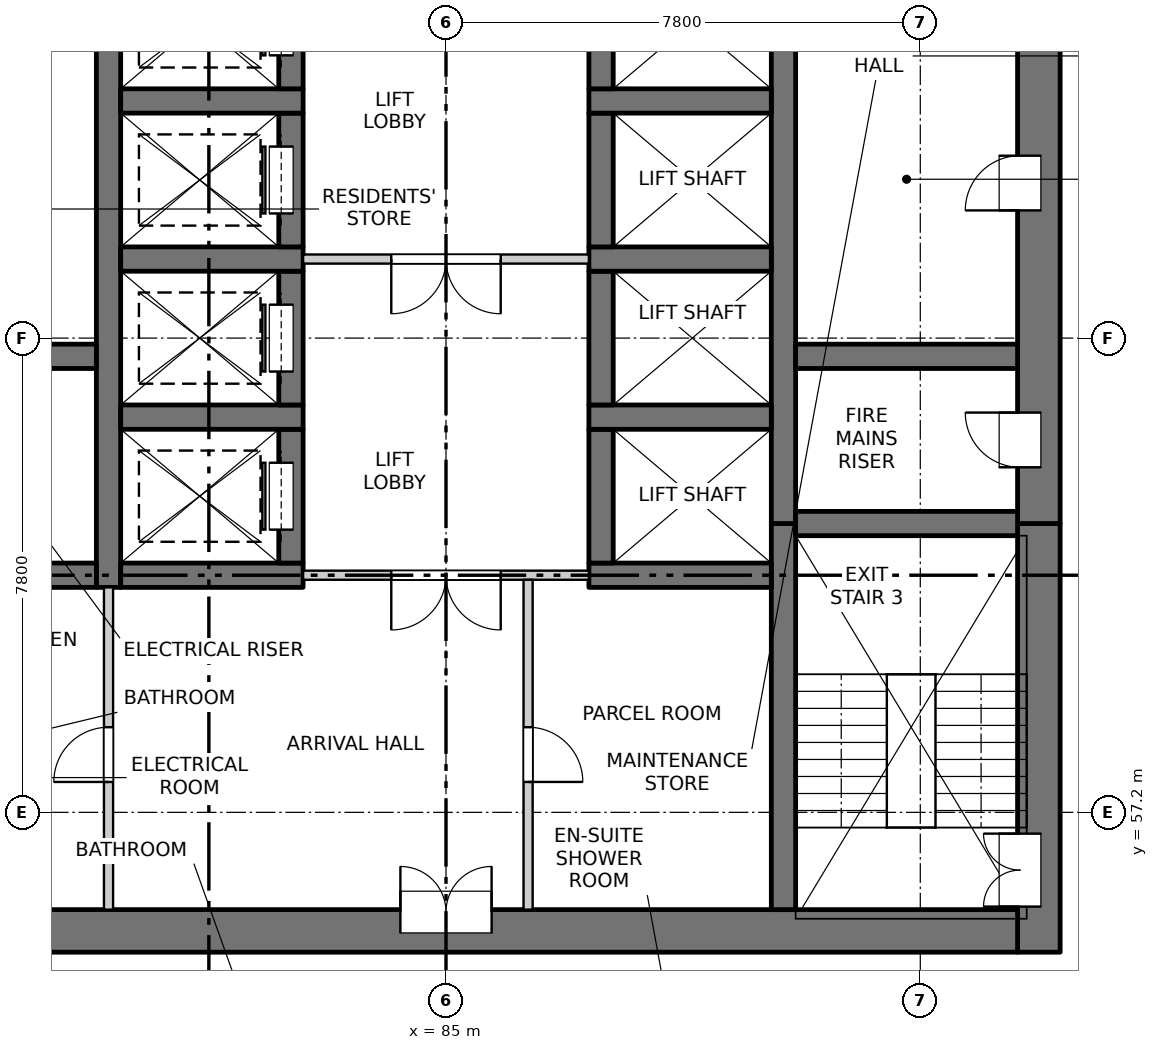
"""IFC4 building model, lengths in metres.
Left out: names, types, materials, properties, quantities, classifications, styles, units other than length and angle.
Written with IfcOpenShell. Run it as: python <this file> out.ifc"""

import sys

from ifc_helpers import new_model, si_unit, direction, frame, frame_2d, origin, place, context, subcontext, project, spatial, rectangle, extrude, element, fill, save


model = new_model("IFC4")
c1 = context("Model", 3, precision=1e-05, world=origin(), true_north=direction((0.0, 1.0)))
c2 = subcontext(c1, "Body", "Model", "MODEL_VIEW")
j1 = project(units=[si_unit("LENGTHUNIT", "METRE"), si_unit("PLANEANGLEUNIT", "RADIAN")], contexts=[c1])
p1 = place(None, origin())
s1 = spatial("IfcSite", under=j1, at=p1, CompositionType="ELEMENT")
p2 = place(p1, origin())
s2 = spatial("IfcBuilding", under=s1, at=p2, CompositionType="ELEMENT")
p3 = place(p2, frame((0.0, 0.0, 43.3)))
s3 = spatial("IfcBuildingStorey", under=s2, at=p3, CompositionType="ELEMENT", Elevation=43.3)
p4 = place(p3, frame((94.75, 54.9, -0.25), z_axis=(0.0, 0.0, 1.0), x_axis=(0.0, 1.0, 0.0)))
e1 = element("IfcWall", 1, at=p4, inside=s3, PredefinedType="SOLIDWALL", context=c2, shape_type="SweptSolid", body=[
    extrude(rectangle(XDim=7.05, YDim=0.7, at=frame_2d((3.525, 0.0))), origin(), (0.0, 0.0, 1.0), 3.35),
])
p5 = place(p4, frame((0.75, 0.0, 0.25)))
e2 = element("IfcOpeningElement", 2, at=p5, cuts=e1, PredefinedType="OPENING", context=c2, shape_type="SweptSolid", body=[
    extrude(rectangle(XDim=1.2, YDim=2.1, at=frame_2d((0.6, 1.05))), frame((0.0, 0.36, 0.0), z_axis=(0.0, -1.0, 0.0), x_axis=(1.0, 0.0, 0.0)), (0.0, 0.0, 1.0), 0.72),
])
p6 = place(p3, frame((94.75, 61.95, -0.25), z_axis=(0.0, 0.0, 1.0), x_axis=(0.0, 1.0, 0.0)))
e3 = element("IfcWall", 3, at=p6, inside=s3, PredefinedType="SOLIDWALL", context=c2, shape_type="SweptSolid", body=[
    extrude(rectangle(XDim=15.35, YDim=0.7, at=frame_2d((7.675, 0.0))), origin(), (0.0, 0.0, 1.0), 3.35),
])
p7 = place(p6, frame((0.925, 0.0, 0.25)))
e4 = element("IfcOpeningElement", 4, at=p7, cuts=e3, PredefinedType="OPENING", context=c2, shape_type="SweptSolid", body=[
    extrude(rectangle(XDim=0.9, YDim=2.1, at=frame_2d((0.45, 1.05))), frame((0.0, 0.36, 0.0), z_axis=(0.0, -1.0, 0.0), x_axis=(1.0, 0.0, 0.0)), (0.0, 0.0, 1.0), 0.72),
])
p8 = place(p6, frame((5.15, 0.0, 0.25)))
e5 = element("IfcOpeningElement", 5, at=p8, cuts=e3, PredefinedType="OPENING", context=c2, shape_type="SweptSolid", body=[
    extrude(rectangle(XDim=0.9, YDim=2.1, at=frame_2d((0.45, 1.05))), frame((0.0, 0.36, 0.0), z_axis=(0.0, -1.0, 0.0), x_axis=(1.0, 0.0, 0.0)), (0.0, 0.0, 1.0), 0.72),
])
p9 = place(p6, frame((9.65, 0.0, 0.25)))
e6 = element("IfcOpeningElement", 6, at=p9, cuts=e3, PredefinedType="OPENING", context=c2, shape_type="SweptSolid", body=[
    extrude(rectangle(XDim=0.9, YDim=2.1, at=frame_2d((0.45, 1.05))), frame((0.0, 0.36, 0.0), z_axis=(0.0, -1.0, 0.0), x_axis=(1.0, 0.0, 0.0)), (0.0, 0.0, 1.0), 0.72),
])
p10 = place(p6, frame((13.1, 0.0, 0.25)))
e7 = element("IfcOpeningElement", 7, at=p10, cuts=e3, PredefinedType="OPENING", context=c2, shape_type="SweptSolid", body=[
    extrude(rectangle(XDim=0.9, YDim=2.1, at=frame_2d((0.45, 1.05))), frame((0.0, 0.36, 0.0), z_axis=(0.0, -1.0, 0.0), x_axis=(1.0, 0.0, 0.0)), (0.0, 0.0, 1.0), 0.72),
])
p11 = place(p3, frame((75.6, 55.25, -0.25), z_axis=(0.0, 0.0, 1.0), x_axis=(1.0, 0.0, 0.0)))
e8 = element("IfcWall", 8, at=p11, inside=s3, PredefinedType="SOLIDWALL", context=c2, shape_type="SweptSolid", body=[
    extrude(rectangle(XDim=18.8, YDim=0.7, at=frame_2d((9.4, 0.0))), origin(), (0.0, 0.0, 1.0), 3.35),
])
p12 = place(p11, frame((8.65, 0.0, 0.25)))
e9 = element("IfcOpeningElement", 9, at=p12, cuts=e8, PredefinedType="OPENING", context=c2, shape_type="SweptSolid", body=[
    extrude(rectangle(XDim=1.5, YDim=2.1, at=frame_2d((0.75, 1.05))), frame((0.0, 0.36, 0.0), z_axis=(0.0, -1.0, 0.0), x_axis=(1.0, 0.0, 0.0)), (0.0, 0.0, 1.0), 0.72),
])
p13 = place(p3, frame((79.45, 60.9, -0.25), z_axis=(0.0, 0.0, 1.0), x_axis=(0.0, 1.0, 0.0)))
e10 = element("IfcWall", 10, at=p13, inside=s3, PredefinedType="SOLIDWALL", context=c2, shape_type="SweptSolid", body=[
    extrude(rectangle(XDim=16.4, YDim=0.4, at=frame_2d((8.2, 0.0))), origin(), (0.0, 0.0, 1.0), 3.35),
])
p14 = place(p3, frame((90.55, 55.6, -0.25), z_axis=(0.0, 0.0, 1.0), x_axis=(0.0, 1.0, 0.0)))
e11 = element("IfcWall", 11, at=p14, inside=s3, PredefinedType="SOLIDWALL", context=c2, shape_type="SweptSolid", body=[
    extrude(rectangle(XDim=6.35, YDim=0.4, at=frame_2d((3.175, 0.0))), origin(), (0.0, 0.0, 1.0), 3.35),
])
p15 = place(p3, frame((90.55, 61.95, -0.25), z_axis=(0.0, 0.0, 1.0), x_axis=(0.0, 1.0, 0.0)))
e12 = element("IfcWall", 12, at=p15, inside=s3, PredefinedType="SOLIDWALL", context=c2, shape_type="SweptSolid", body=[
    extrude(rectangle(XDim=15.35, YDim=0.4, at=frame_2d((7.675, 0.0))), origin(), (0.0, 0.0, 1.0), 3.35),
])
p16 = place(p3, frame((79.65, 61.1, -0.25), z_axis=(0.0, 0.0, 1.0), x_axis=(1.0, 0.0, 0.0)))
e13 = element("IfcWall", 13, at=p16, inside=s3, PredefinedType="SOLIDWALL", context=c2, shape_type="SweptSolid", body=[
    extrude(rectangle(XDim=3.0, YDim=0.4, at=frame_2d((1.5, 0.0))), origin(), (0.0, 0.0, 1.0), 3.35),
])
p17 = place(p3, frame((82.45, 61.3, -0.25), z_axis=(0.0, 0.0, 1.0), x_axis=(0.0, 1.0, 0.0)))
e14 = element("IfcWall", 14, at=p17, inside=s3, PredefinedType="SOLIDWALL", context=c2, shape_type="SweptSolid", body=[
    extrude(rectangle(XDim=2.2, YDim=0.4, at=frame_2d((1.1, 0.0))), origin(), (0.0, 0.0, 1.0), 3.35),
])
p18 = place(p17, frame((0.55, 0.0, 0.25)))
e15 = element("IfcOpeningElement", 15, at=p18, cuts=e14, PredefinedType="OPENING", context=c2, shape_type="SweptSolid", body=[
    extrude(rectangle(XDim=1.1, YDim=2.1, at=frame_2d((0.55, 1.05))), frame((0.0, 0.21, 0.0), z_axis=(0.0, -1.0, 0.0), x_axis=(1.0, 0.0, 0.0)), (0.0, 0.0, 1.0), 0.42),
])
p19 = place(p3, frame((79.65, 63.7, -0.25), z_axis=(0.0, 0.0, 1.0), x_axis=(1.0, 0.0, 0.0)))
e16 = element("IfcWall", 16, at=p19, inside=s3, PredefinedType="SOLIDWALL", context=c2, shape_type="SweptSolid", body=[
    extrude(rectangle(XDim=3.0, YDim=0.4, at=frame_2d((1.5, 0.0))), origin(), (0.0, 0.0, 1.0), 3.35),
])
p20 = place(p3, frame((82.45, 63.9, -0.25), z_axis=(0.0, 0.0, 1.0), x_axis=(0.0, 1.0, 0.0)))
e17 = element("IfcWall", 17, at=p20, inside=s3, PredefinedType="SOLIDWALL", context=c2, shape_type="SweptSolid", body=[
    extrude(rectangle(XDim=2.2, YDim=0.4, at=frame_2d((1.1, 0.0))), origin(), (0.0, 0.0, 1.0), 3.35),
])
p21 = place(p20, frame((0.55, 0.0, 0.25)))
e18 = element("IfcOpeningElement", 18, at=p21, cuts=e17, PredefinedType="OPENING", context=c2, shape_type="SweptSolid", body=[
    extrude(rectangle(XDim=1.1, YDim=2.1, at=frame_2d((0.55, 1.05))), frame((0.0, 0.21, 0.0), z_axis=(0.0, -1.0, 0.0), x_axis=(1.0, 0.0, 0.0)), (0.0, 0.0, 1.0), 0.42),
])
p22 = place(p3, frame((79.65, 66.3, -0.25), z_axis=(0.0, 0.0, 1.0), x_axis=(1.0, 0.0, 0.0)))
e19 = element("IfcWall", 19, at=p22, inside=s3, PredefinedType="SOLIDWALL", context=c2, shape_type="SweptSolid", body=[
    extrude(rectangle(XDim=3.0, YDim=0.4, at=frame_2d((1.5, 0.0))), origin(), (0.0, 0.0, 1.0), 3.35),
])
p23 = place(p3, frame((82.45, 66.5, -0.25), z_axis=(0.0, 0.0, 1.0), x_axis=(0.0, 1.0, 0.0)))
e20 = element("IfcWall", 20, at=p23, inside=s3, PredefinedType="SOLIDWALL", context=c2, shape_type="SweptSolid", body=[
    extrude(rectangle(XDim=2.2, YDim=0.4, at=frame_2d((1.1, 0.0))), origin(), (0.0, 0.0, 1.0), 3.35),
])
p24 = place(p23, frame((0.55, 0.0, 0.25)))
e21 = element("IfcOpeningElement", 21, at=p24, cuts=e20, PredefinedType="OPENING", context=c2, shape_type="SweptSolid", body=[
    extrude(rectangle(XDim=1.1, YDim=2.1, at=frame_2d((0.55, 1.05))), frame((0.0, 0.21, 0.0), z_axis=(0.0, -1.0, 0.0), x_axis=(1.0, 0.0, 0.0)), (0.0, 0.0, 1.0), 0.42),
])
p25 = place(p3, frame((79.65, 68.9, -0.25), z_axis=(0.0, 0.0, 1.0), x_axis=(1.0, 0.0, 0.0)))
e22 = element("IfcWall", 22, at=p25, inside=s3, PredefinedType="SOLIDWALL", context=c2, shape_type="SweptSolid", body=[
    extrude(rectangle(XDim=3.0, YDim=0.4, at=frame_2d((1.5, 0.0))), origin(), (0.0, 0.0, 1.0), 3.35),
])
p26 = place(p3, frame((82.45, 69.1, -0.25), z_axis=(0.0, 0.0, 1.0), x_axis=(0.0, 1.0, 0.0)))
e23 = element("IfcWall", 23, at=p26, inside=s3, PredefinedType="SOLIDWALL", context=c2, shape_type="SweptSolid", body=[
    extrude(rectangle(XDim=2.2, YDim=0.4, at=frame_2d((1.1, 0.0))), origin(), (0.0, 0.0, 1.0), 3.35),
])
p27 = place(p26, frame((0.55, 0.0, 0.25)))
e24 = element("IfcOpeningElement", 24, at=p27, cuts=e23, PredefinedType="OPENING", context=c2, shape_type="SweptSolid", body=[
    extrude(rectangle(XDim=1.1, YDim=2.1, at=frame_2d((0.55, 1.05))), frame((0.0, 0.21, 0.0), z_axis=(0.0, -1.0, 0.0), x_axis=(1.0, 0.0, 0.0)), (0.0, 0.0, 1.0), 0.42),
])
p28 = place(p3, frame((87.35, 61.1, -0.25), z_axis=(0.0, 0.0, 1.0), x_axis=(1.0, 0.0, 0.0)))
e25 = element("IfcWall", 25, at=p28, inside=s3, PredefinedType="SOLIDWALL", context=c2, shape_type="SweptSolid", body=[
    extrude(rectangle(XDim=3.0, YDim=0.4, at=frame_2d((1.5, 0.0))), origin(), (0.0, 0.0, 1.0), 3.35),
])
p29 = place(p3, frame((87.55, 61.3, -0.25), z_axis=(0.0, 0.0, 1.0), x_axis=(0.0, 1.0, 0.0)))
e26 = element("IfcWall", 26, at=p29, inside=s3, PredefinedType="SOLIDWALL", context=c2, shape_type="SweptSolid", body=[
    extrude(rectangle(XDim=2.2, YDim=0.4, at=frame_2d((1.1, 0.0))), origin(), (0.0, 0.0, 1.0), 3.35),
])
p30 = place(p3, frame((87.35, 63.7, -0.25), z_axis=(0.0, 0.0, 1.0), x_axis=(1.0, 0.0, 0.0)))
e27 = element("IfcWall", 27, at=p30, inside=s3, PredefinedType="SOLIDWALL", context=c2, shape_type="SweptSolid", body=[
    extrude(rectangle(XDim=3.0, YDim=0.4, at=frame_2d((1.5, 0.0))), origin(), (0.0, 0.0, 1.0), 3.35),
])
p31 = place(p3, frame((87.55, 63.9, -0.25), z_axis=(0.0, 0.0, 1.0), x_axis=(0.0, 1.0, 0.0)))
e28 = element("IfcWall", 28, at=p31, inside=s3, PredefinedType="SOLIDWALL", context=c2, shape_type="SweptSolid", body=[
    extrude(rectangle(XDim=2.2, YDim=0.4, at=frame_2d((1.1, 0.0))), origin(), (0.0, 0.0, 1.0), 3.35),
])
p32 = place(p3, frame((87.35, 66.3, -0.25), z_axis=(0.0, 0.0, 1.0), x_axis=(1.0, 0.0, 0.0)))
e29 = element("IfcWall", 29, at=p32, inside=s3, PredefinedType="SOLIDWALL", context=c2, shape_type="SweptSolid", body=[
    extrude(rectangle(XDim=3.0, YDim=0.4, at=frame_2d((1.5, 0.0))), origin(), (0.0, 0.0, 1.0), 3.35),
])
p33 = place(p3, frame((87.55, 66.5, -0.25), z_axis=(0.0, 0.0, 1.0), x_axis=(0.0, 1.0, 0.0)))
e30 = element("IfcWall", 30, at=p33, inside=s3, PredefinedType="SOLIDWALL", context=c2, shape_type="SweptSolid", body=[
    extrude(rectangle(XDim=2.2, YDim=0.4, at=frame_2d((1.1, 0.0))), origin(), (0.0, 0.0, 1.0), 3.35),
])
p34 = place(p3, frame((87.35, 68.9, -0.25), z_axis=(0.0, 0.0, 1.0), x_axis=(1.0, 0.0, 0.0)))
e31 = element("IfcWall", 31, at=p34, inside=s3, PredefinedType="SOLIDWALL", context=c2, shape_type="SweptSolid", body=[
    extrude(rectangle(XDim=3.0, YDim=0.4, at=frame_2d((1.5, 0.0))), origin(), (0.0, 0.0, 1.0), 3.35),
])
p35 = place(p3, frame((87.55, 69.1, -0.25), z_axis=(0.0, 0.0, 1.0), x_axis=(0.0, 1.0, 0.0)))
e32 = element("IfcWall", 32, at=p35, inside=s3, PredefinedType="SOLIDWALL", context=c2, shape_type="SweptSolid", body=[
    extrude(rectangle(XDim=2.2, YDim=0.4, at=frame_2d((1.1, 0.0))), origin(), (0.0, 0.0, 1.0), 3.35),
])
for number, where, z_axis, x_axis in (
    (33, (75.6, 61.1, -0.25), (0.0, 0.0, 1.0), (1.0, 0.0, 0.0)),
    (34, (75.6, 64.7, -0.25), (0.0, 0.0, 1.0), (1.0, 0.0, 0.0)),
    (35, (90.75, 61.95, -0.25), (0.0, 0.0, 1.0), (1.0, 0.0, 0.0)),
    (36, (90.75, 64.7, -0.25), (0.0, 0.0, 1.0), (1.0, 0.0, 0.0)),
):
    element("IfcWall", number, at=place(p3, frame(where, z_axis=z_axis, x_axis=x_axis)), inside=s3, PredefinedType="SOLIDWALL", context=c2, shape_type="SweptSolid", body=[
        extrude(rectangle(XDim=3.65, YDim=0.4, at=frame_2d((1.825, 0.0))), origin(), (0.0, 0.0, 1.0), 3.35),
    ])
p36 = place(p3, frame((82.65, 61.1, 0.0), z_axis=(0.0, 0.0, 1.0), x_axis=(1.0, 0.0, 0.0)))
e37 = element("IfcWall", 37, at=p36, inside=s3, PredefinedType="PARTITIONING", context=c2, shape_type="SweptSolid", body=[
    extrude(rectangle(XDim=4.7, YDim=0.15, at=frame_2d((2.35, 0.0))), origin(), (0.0, 0.0, 1.0), 3.1),
])
p37 = place(p36, frame((1.45, 0.0, 0.0)))
e38 = element("IfcOpeningElement", 38, at=p37, cuts=e37, PredefinedType="OPENING", context=c2, shape_type="SweptSolid", body=[
    extrude(rectangle(XDim=1.8, YDim=2.1, at=frame_2d((0.9, 1.05))), frame((0.0, 0.085, 0.0), z_axis=(0.0, -1.0, 0.0), x_axis=(1.0, 0.0, 0.0)), (0.0, 0.0, 1.0), 0.17),
])
p38 = place(p3, frame((82.65, 66.3, 0.0), z_axis=(0.0, 0.0, 1.0), x_axis=(1.0, 0.0, 0.0)))
e39 = element("IfcWall", 39, at=p38, inside=s3, PredefinedType="PARTITIONING", context=c2, shape_type="SweptSolid", body=[
    extrude(rectangle(XDim=4.7, YDim=0.15, at=frame_2d((2.35, 0.0))), origin(), (0.0, 0.0, 1.0), 3.1),
])
p39 = place(p38, frame((1.45, 0.0, 0.0)))
e40 = element("IfcOpeningElement", 40, at=p39, cuts=e39, PredefinedType="OPENING", context=c2, shape_type="SweptSolid", body=[
    extrude(rectangle(XDim=1.8, YDim=2.1, at=frame_2d((0.9, 1.05))), frame((0.0, 0.085, 0.0), z_axis=(0.0, -1.0, 0.0), x_axis=(1.0, 0.0, 0.0)), (0.0, 0.0, 1.0), 0.17),
])
p40 = place(p3, frame((79.45, 55.6, 0.0), z_axis=(0.0, 0.0, 1.0), x_axis=(0.0, 1.0, 0.0)))
e41 = element("IfcWall", 41, at=p40, inside=s3, PredefinedType="PARTITIONING", context=c2, shape_type="SweptSolid", body=[
    extrude(rectangle(XDim=5.3, YDim=0.15, at=frame_2d((2.65, 0.0))), origin(), (0.0, 0.0, 1.0), 3.1),
])
p41 = place(p40, frame((2.1, 0.0, 0.0)))
e42 = element("IfcOpeningElement", 42, at=p41, cuts=e41, PredefinedType="OPENING", context=c2, shape_type="SweptSolid", body=[
    extrude(rectangle(XDim=0.9, YDim=2.1, at=frame_2d((0.45, 1.05))), frame((0.0, 0.085, 0.0), z_axis=(0.0, -1.0, 0.0), x_axis=(1.0, 0.0, 0.0)), (0.0, 0.0, 1.0), 0.17),
])
p42 = place(p3, frame((86.35, 55.6, 0.0), z_axis=(0.0, 0.0, 1.0), x_axis=(0.0, 1.0, 0.0)))
e43 = element("IfcWall", 43, at=p42, inside=s3, PredefinedType="PARTITIONING", context=c2, shape_type="SweptSolid", body=[
    extrude(rectangle(XDim=5.425, YDim=0.15, at=frame_2d((2.712, 0.0))), origin(), (0.0, 0.0, 1.0), 3.1),
])
p43 = place(p42, frame((2.1, 0.0, 0.0)))
e44 = element("IfcOpeningElement", 44, at=p43, cuts=e43, PredefinedType="OPENING", context=c2, shape_type="SweptSolid", body=[
    extrude(rectangle(XDim=0.9, YDim=2.1, at=frame_2d((0.45, 1.05))), frame((0.0, 0.085, 0.0), z_axis=(0.0, -1.0, 0.0), x_axis=(1.0, 0.0, 0.0)), (0.0, 0.0, 1.0), 0.17),
])
p44 = place(p12, origin())
e45 = element("IfcDoor", 45, at=p44, inside=s3, OperationType="DOUBLE_DOOR_SINGLE_SWING", PredefinedType="DOOR", context=c2, shape_type="SweptSolid", body=[
    extrude(rectangle(XDim=1.5, YDim=2.1, at=frame_2d((0.75, 1.05))), frame((0.0, 0.335, 0.0), z_axis=(0.0, -1.0, 0.0), x_axis=(1.0, 0.0, 0.0)), (0.0, 0.0, 1.0), 0.05),
])
fill(e9, e45)
p45 = place(p5, origin())
e46 = element("IfcDoor", 46, at=p45, inside=s3, OperationType="DOUBLE_DOOR_SINGLE_SWING", PredefinedType="DOOR", context=c2, shape_type="SweptSolid", body=[
    extrude(rectangle(XDim=1.2, YDim=2.1, at=frame_2d((0.6, 1.05))), frame((0.0, 0.335, 0.0), z_axis=(0.0, -1.0, 0.0), x_axis=(1.0, 0.0, 0.0)), (0.0, 0.0, 1.0), 0.05),
])
fill(e2, e46)
p46 = place(p41, origin())
e47 = element("IfcDoor", 47, at=p46, inside=s3, OperationType="SINGLE_SWING_LEFT", PredefinedType="DOOR", context=c2, shape_type="SweptSolid", body=[
    extrude(rectangle(XDim=0.9, YDim=2.1, at=frame_2d((0.45, 1.05))), frame((0.0, 0.025, 0.0), z_axis=(0.0, -1.0, 0.0), x_axis=(1.0, 0.0, 0.0)), (0.0, 0.0, 1.0), 0.05),
])
fill(e42, e47)
p47 = place(p43, origin())
e48 = element("IfcDoor", 48, at=p47, inside=s3, OperationType="SINGLE_SWING_RIGHT", PredefinedType="DOOR", context=c2, shape_type="SweptSolid", body=[
    extrude(rectangle(XDim=0.9, YDim=2.1, at=frame_2d((0.45, 1.05))), frame((0.0, 0.025, 0.0), z_axis=(0.0, -1.0, 0.0), x_axis=(1.0, 0.0, 0.0)), (0.0, 0.0, 1.0), 0.05),
])
fill(e44, e48)
p48 = place(p37, origin())
e49 = element("IfcDoor", 49, at=p48, inside=s3, OperationType="DOUBLE_DOOR_SINGLE_SWING", PredefinedType="DOOR", context=c2, shape_type="SweptSolid", body=[
    extrude(rectangle(XDim=1.8, YDim=2.1, at=frame_2d((0.9, 1.05))), frame((0.0, 0.025, 0.0), z_axis=(0.0, -1.0, 0.0), x_axis=(1.0, 0.0, 0.0)), (0.0, 0.0, 1.0), 0.05),
])
fill(e38, e49)
p49 = place(p18, origin())
e50 = element("IfcDoor", 50, at=p49, inside=s3, OperationType="SLIDING_TO_RIGHT", PredefinedType="DOOR", context=c2, shape_type="SweptSolid", body=[
    extrude(rectangle(XDim=1.1, YDim=2.1, at=frame_2d((0.55, 1.05))), frame((0.0, 0.185, 0.0), z_axis=(0.0, -1.0, 0.0), x_axis=(1.0, 0.0, 0.0)), (0.0, 0.0, 1.0), 0.05),
])
fill(e15, e50)
p50 = place(p7, origin())
e51 = element("IfcDoor", 51, at=p50, inside=s3, OperationType="SINGLE_SWING_RIGHT", PredefinedType="DOOR", context=c2, shape_type="SweptSolid", body=[
    extrude(rectangle(XDim=0.9, YDim=2.1, at=frame_2d((0.45, 1.05))), frame((0.0, 0.335, 0.0), z_axis=(0.0, -1.0, 0.0), x_axis=(1.0, 0.0, 0.0)), (0.0, 0.0, 1.0), 0.05),
])
fill(e4, e51)
p51 = place(p21, origin())
e52 = element("IfcDoor", 52, at=p51, inside=s3, OperationType="SLIDING_TO_RIGHT", PredefinedType="DOOR", context=c2, shape_type="SweptSolid", body=[
    extrude(rectangle(XDim=1.1, YDim=2.1, at=frame_2d((0.55, 1.05))), frame((0.0, 0.185, 0.0), z_axis=(0.0, -1.0, 0.0), x_axis=(1.0, 0.0, 0.0)), (0.0, 0.0, 1.0), 0.05),
])
fill(e18, e52)
p52 = place(p39, origin())
e53 = element("IfcDoor", 53, at=p52, inside=s3, OperationType="DOUBLE_DOOR_SINGLE_SWING", PredefinedType="DOOR", context=c2, shape_type="SweptSolid", body=[
    extrude(rectangle(XDim=1.8, YDim=2.1, at=frame_2d((0.9, 1.05))), frame((0.0, 0.025, 0.0), z_axis=(0.0, -1.0, 0.0), x_axis=(1.0, 0.0, 0.0)), (0.0, 0.0, 1.0), 0.05),
])
fill(e40, e53)
p53 = place(p8, origin())
e54 = element("IfcDoor", 54, at=p53, inside=s3, OperationType="SINGLE_SWING_LEFT", PredefinedType="DOOR", context=c2, shape_type="SweptSolid", body=[
    extrude(rectangle(XDim=0.9, YDim=2.1, at=frame_2d((0.45, 1.05))), frame((0.0, 0.335, 0.0), z_axis=(0.0, -1.0, 0.0), x_axis=(1.0, 0.0, 0.0)), (0.0, 0.0, 1.0), 0.05),
])
fill(e5, e54)
p54 = place(p24, origin())
e55 = element("IfcDoor", 55, at=p54, inside=s3, OperationType="SLIDING_TO_RIGHT", PredefinedType="DOOR", context=c2, shape_type="SweptSolid", body=[
    extrude(rectangle(XDim=1.1, YDim=2.1, at=frame_2d((0.55, 1.05))), frame((0.0, 0.185, 0.0), z_axis=(0.0, -1.0, 0.0), x_axis=(1.0, 0.0, 0.0)), (0.0, 0.0, 1.0), 0.05),
])
fill(e21, e55)
p55 = place(p27, origin())
e56 = element("IfcDoor", 56, at=p55, inside=s3, OperationType="SLIDING_TO_LEFT", PredefinedType="DOOR", context=c2, shape_type="SweptSolid", body=[
    extrude(rectangle(XDim=1.1, YDim=2.1, at=frame_2d((0.55, 1.05))), frame((0.0, 0.185, 0.0), z_axis=(0.0, -1.0, 0.0), x_axis=(1.0, 0.0, 0.0)), (0.0, 0.0, 1.0), 0.05),
])
fill(e24, e56)
save(model, sys.argv[1])
